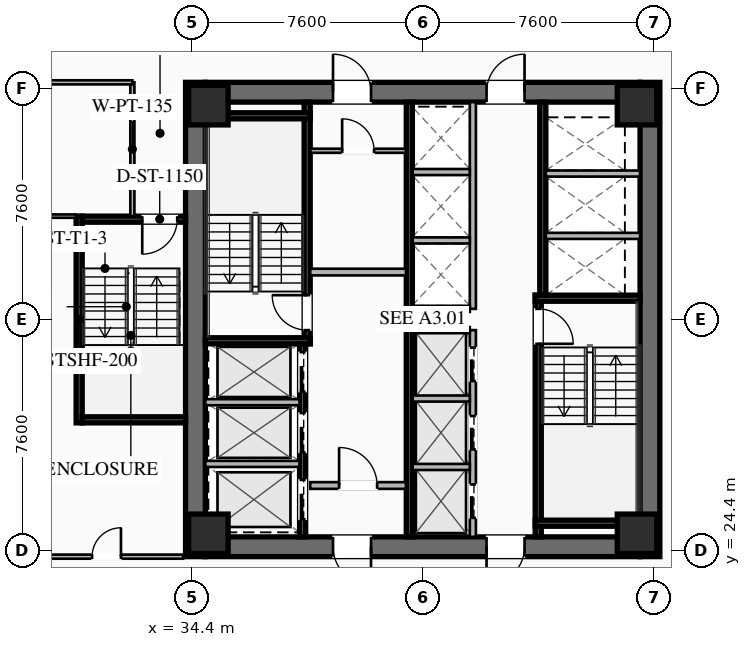
"""IFC4 building model, lengths in metres.
Left out: names, types, materials, properties, quantities, classifications, styles, units other than length and angle.
Written with IfcOpenShell. Run it as: python <this file> out.ifc"""

import sys

from ifc_helpers import new_model, si_unit, direction, frame, frame_2d, origin, origin_2d, place, context, subcontext, project, spatial, rectangle, hollow_rectangle, extrude, element, fill, save


model = new_model("IFC4")
c1 = context("Model", 3, precision=1e-05, world=origin(), true_north=direction((0.0, 1.0)))
c2 = subcontext(c1, "Body", "Model", "MODEL_VIEW")
j1 = project(units=[si_unit("LENGTHUNIT", "METRE"), si_unit("PLANEANGLEUNIT", "RADIAN")], contexts=[c1])
p1 = place(None, origin())
s1 = spatial("IfcSite", under=j1, at=p1, CompositionType="ELEMENT")
p2 = place(p1, origin())
s2 = spatial("IfcBuilding", under=s1, at=p2, CompositionType="ELEMENT")
p3 = place(p2, frame((0.0, 0.0, 63.65)))
s3 = spatial("IfcBuildingStorey", under=s2, at=p3, CompositionType="ELEMENT", Elevation=63.65)
for number, where, z_axis, x_axis in (
    (1, (34.525, 24.2, 0.0), (0.0, 0.0, 1.0), (0.0, 1.0, 0.0)),
    (2, (49.475, 39.8, 0.0), (0.0, 0.0, 1.0), (0.0, -1.0, 0.0)),
):
    element("IfcWall", number, at=place(p3, frame(where, z_axis=z_axis, x_axis=x_axis)), inside=s3, PredefinedType="SHEAR", context=c2, shape_type="SweptSolid", body=[
        extrude(rectangle(XDim=15.6, YDim=0.65, at=frame_2d((7.8, 0.0))), origin(), (0.0, 0.0, 1.0), 3.55),
    ])
p4 = place(p3, frame((49.15, 24.525, 0.0), z_axis=(0.0, 0.0, 1.0), x_axis=(-1.0, 0.0, 0.0)))
e3 = element("IfcWall", 3, at=p4, inside=s3, PredefinedType="SHEAR", context=c2, shape_type="SweptSolid", body=[
    extrude(rectangle(XDim=14.3, YDim=0.65, at=frame_2d((7.15, 0.0))), origin(), (0.0, 0.0, 1.0), 3.55),
])
p5 = place(p4, frame((8.85, 0.0, 0.0)))
e4 = element("IfcOpeningElement", 4, at=p5, cuts=e3, PredefinedType="OPENING", context=c2, shape_type="SweptSolid", body=[
    extrude(rectangle(XDim=1.25, YDim=2.25, at=frame_2d((0.625, 1.125))), frame((0.0, 0.335, 0.0), z_axis=(0.0, -1.0, 0.0), x_axis=(1.0, 0.0, 0.0)), (0.0, 0.0, 1.0), 0.67),
])
p6 = place(p4, frame((3.8, 0.0, 0.0)))
e5 = element("IfcOpeningElement", 5, at=p6, cuts=e3, PredefinedType="OPENING", context=c2, shape_type="SweptSolid", body=[
    extrude(rectangle(XDim=1.25, YDim=2.25, at=frame_2d((0.625, 1.125))), frame((0.0, 0.335, 0.0), z_axis=(0.0, -1.0, 0.0), x_axis=(1.0, 0.0, 0.0)), (0.0, 0.0, 1.0), 0.67),
])
p7 = place(p3, frame((34.85, 39.475, 0.0), z_axis=(0.0, 0.0, 1.0), x_axis=(1.0, 0.0, 0.0)))
e6 = element("IfcWall", 6, at=p7, inside=s3, PredefinedType="SHEAR", context=c2, shape_type="SweptSolid", body=[
    extrude(rectangle(XDim=14.3, YDim=0.65, at=frame_2d((7.15, 0.0))), origin(), (0.0, 0.0, 1.0), 3.55),
])
p8 = place(p7, frame((4.2, 0.0, 0.0)))
e7 = element("IfcOpeningElement", 7, at=p8, cuts=e6, PredefinedType="OPENING", context=c2, shape_type="SweptSolid", body=[
    extrude(rectangle(XDim=1.25, YDim=2.25, at=frame_2d((0.625, 1.125))), frame((0.0, 0.335, 0.0), z_axis=(0.0, -1.0, 0.0), x_axis=(1.0, 0.0, 0.0)), (0.0, 0.0, 1.0), 0.67),
])
p9 = place(p7, frame((9.25, 0.0, 0.0)))
e8 = element("IfcOpeningElement", 8, at=p9, cuts=e6, PredefinedType="OPENING", context=c2, shape_type="SweptSolid", body=[
    extrude(rectangle(XDim=1.25, YDim=2.25, at=frame_2d((0.625, 1.125))), frame((0.0, 0.335, 0.0), z_axis=(0.0, -1.0, 0.0), x_axis=(1.0, 0.0, 0.0)), (0.0, 0.0, 1.0), 0.67),
])
for number, where, z_axis, x_axis in (
    (9, (34.95, 24.95, 0.0), (0.0, 0.0, 1.0), (1.0, 0.0, 0.0)),
    (10, (49.05, 24.95, 0.0), (0.0, 0.0, 1.0), (1.0, 0.0, 0.0)),
    (11, (49.05, 39.05, 0.0), (0.0, 0.0, 1.0), (1.0, 0.0, 0.0)),
    (12, (34.95, 39.05, 0.0), (0.0, 0.0, 1.0), (1.0, 0.0, 0.0)),
):
    element("IfcColumn", number, at=place(p3, frame(where, z_axis=z_axis, x_axis=x_axis)), inside=s3, PredefinedType="COLUMN", context=c2, shape_type="SweptSolid", body=[
        extrude(hollow_rectangle(XDim=1.3, YDim=1.3, WallThickness=0.05, at=origin_2d()), origin(), (0.0, 0.0, 1.0), 3.35),
    ])
p10 = place(p3, frame((38.2, 31.2, 0.0), z_axis=(0.0, 0.0, 1.0), x_axis=(0.0, 1.0, 0.0)))
e13 = element("IfcWall", 13, at=p10, inside=s3, PredefinedType="SHEAR", context=c2, shape_type="SweptSolid", body=[
    extrude(rectangle(XDim=7.95, YDim=0.2, at=frame_2d((3.975, 0.0))), origin(), (0.0, 0.0, 1.0), 3.35),
])
p11 = place(p10, frame((0.45, 0.0, 0.0)))
e14 = element("IfcOpeningElement", 14, at=p11, cuts=e13, PredefinedType="OPENING", context=c2, shape_type="SweptSolid", body=[
    extrude(rectangle(XDim=1.15, YDim=2.2, at=frame_2d((0.575, 1.1))), frame((0.0, 0.11, 0.0), z_axis=(0.0, -1.0, 0.0), x_axis=(1.0, 0.0, 0.0)), (0.0, 0.0, 1.0), 0.22),
])
for number, where, z_axis, x_axis in (
    (15, (34.85, 31.3, 0.0), (0.0, 0.0, 1.0), (1.0, 0.0, 0.0)),
    (16, (34.85, 38.7, 0.0), (0.0, 0.0, 1.0), (1.0, 0.0, 0.0)),
):
    element("IfcWall", number, at=place(p3, frame(where, z_axis=z_axis, x_axis=x_axis)), inside=s3, PredefinedType="SHEAR", context=c2, shape_type="SweptSolid", body=[
        extrude(rectangle(XDim=3.45, YDim=0.2, at=frame_2d((1.725, 0.0))), origin(), (0.0, 0.0, 1.0), 3.35),
    ])
p12 = place(p3, frame((45.8, 32.8, 0.0), z_axis=(0.0, 0.0, 1.0), x_axis=(0.0, -1.0, 0.0)))
e17 = element("IfcWall", 17, at=p12, inside=s3, PredefinedType="SHEAR", context=c2, shape_type="SweptSolid", body=[
    extrude(rectangle(XDim=7.95, YDim=0.2, at=frame_2d((3.975, 0.0))), origin(), (0.0, 0.0, 1.0), 3.35),
])
p13 = place(p12, frame((0.45, 0.0, 0.0)))
e18 = element("IfcOpeningElement", 18, at=p13, cuts=e17, PredefinedType="OPENING", context=c2, shape_type="SweptSolid", body=[
    extrude(rectangle(XDim=1.15, YDim=2.2, at=frame_2d((0.575, 1.1))), frame((0.0, 0.11, 0.0), z_axis=(0.0, -1.0, 0.0), x_axis=(1.0, 0.0, 0.0)), (0.0, 0.0, 1.0), 0.22),
])
for number, where, z_axis, x_axis in (
    (19, (45.7, 32.7, 0.0), (0.0, 0.0, 1.0), (1.0, 0.0, 0.0)),
    (20, (45.7, 25.3, 0.0), (0.0, 0.0, 1.0), (1.0, 0.0, 0.0)),
):
    element("IfcWall", number, at=place(p3, frame(where, z_axis=z_axis, x_axis=x_axis)), inside=s3, PredefinedType="SHEAR", context=c2, shape_type="SweptSolid", body=[
        extrude(rectangle(XDim=3.45, YDim=0.2, at=frame_2d((1.725, 0.0))), origin(), (0.0, 0.0, 1.0), 3.35),
    ])
p14 = place(p3, frame((41.56, 24.85, 0.0), z_axis=(0.0, 0.0, 1.0), x_axis=(0.0, 1.0, 0.0)))
e21 = element("IfcWall", 21, at=p14, inside=s3, PredefinedType="SHEAR", context=c2, shape_type="SweptSolid", body=[
    extrude(rectangle(XDim=14.3, YDim=0.2, at=frame_2d((7.15, 0.0))), origin(), (0.0, 0.0, 1.0), 3.35),
])
p15 = place(p3, frame((38.3, 33.56, 0.0), z_axis=(0.0, 0.0, 1.0), x_axis=(1.0, 0.0, 0.0)))
e22 = element("IfcWall", 22, at=p15, inside=s3, PredefinedType="SOLIDWALL", context=c2, shape_type="SweptSolid", body=[
    extrude(rectangle(XDim=3.15, YDim=0.22, at=frame_2d((1.575, 0.0))), origin(), (0.0, 0.0, 1.0), 2.493),
])
p16 = place(p3, frame((38.3, 26.54, 0.0), z_axis=(0.0, 0.0, 1.0), x_axis=(1.0, 0.0, 0.0)))
e23 = element("IfcWall", 23, at=p16, inside=s3, PredefinedType="SOLIDWALL", context=c2, shape_type="SweptSolid", body=[
    extrude(rectangle(XDim=3.15, YDim=0.22, at=frame_2d((1.575, 0.0))), origin(), (0.0, 0.0, 1.0), 2.493),
])
p17 = place(p16, frame((0.95, 0.0, 0.0)))
e24 = element("IfcOpeningElement", 24, at=p17, cuts=e23, PredefinedType="OPENING", context=c2, shape_type="SweptSolid", body=[
    extrude(rectangle(XDim=1.25, YDim=2.25, at=frame_2d((0.625, 1.125))), frame((0.0, 0.12, 0.0), z_axis=(0.0, -1.0, 0.0), x_axis=(1.0, 0.0, 0.0)), (0.0, 0.0, 1.0), 0.24),
])
p18 = place(p3, frame((38.05, 24.85, 0.0), z_axis=(0.0, 0.0, 1.0), x_axis=(0.0, 1.0, 0.0)))
e25 = element("IfcWall", 25, at=p18, inside=s3, PredefinedType="SHEAR", context=c2, shape_type="SweptSolid", body=[
    extrude(rectangle(XDim=6.35, YDim=0.2, at=frame_2d((3.175, 0.0))), origin(), (0.0, 0.0, 1.0), 3.35),
])
p19 = place(p18, frame((4.775, 0.0, 0.0)))
e26 = element("IfcOpeningElement", 26, at=p19, cuts=e25, PredefinedType="OPENING", context=c2, shape_type="SweptSolid", body=[
    extrude(rectangle(XDim=1.3, YDim=2.25, at=frame_2d((0.65, 1.125))), frame((0.0, 0.11, 0.0), z_axis=(0.0, -1.0, 0.0), x_axis=(1.0, 0.0, 0.0)), (0.0, 0.0, 1.0), 0.22),
])
p20 = place(p18, frame((2.775, 0.0, 0.0)))
e27 = element("IfcOpeningElement", 27, at=p20, cuts=e25, PredefinedType="OPENING", context=c2, shape_type="SweptSolid", body=[
    extrude(rectangle(XDim=1.3, YDim=2.25, at=frame_2d((0.65, 1.125))), frame((0.0, 0.11, 0.0), z_axis=(0.0, -1.0, 0.0), x_axis=(1.0, 0.0, 0.0)), (0.0, 0.0, 1.0), 0.22),
])
p21 = place(p18, frame((0.575, 0.0, 0.0)))
e28 = element("IfcOpeningElement", 28, at=p21, cuts=e25, PredefinedType="OPENING", context=c2, shape_type="SweptSolid", body=[
    extrude(rectangle(XDim=1.3, YDim=2.25, at=frame_2d((0.65, 1.125))), frame((0.0, 0.11, 0.0), z_axis=(0.0, -1.0, 0.0), x_axis=(1.0, 0.0, 0.0)), (0.0, 0.0, 1.0), 0.22),
])
for number, where, z_axis, x_axis in (
    (29, (34.85, 27.25, 0.0), (0.0, 0.0, 1.0), (1.0, 0.0, 0.0)),
    (30, (34.85, 29.28, 0.0), (0.0, 0.0, 1.0), (1.0, 0.0, 0.0)),
):
    element("IfcWall", number, at=place(p3, frame(where, z_axis=z_axis, x_axis=x_axis)), inside=s3, PredefinedType="SOLIDWALL", context=c2, shape_type="SweptSolid", body=[
        extrude(rectangle(XDim=3.1, YDim=0.2, at=frame_2d((1.55, 0.0))), origin(), (0.0, 0.0, 1.0), 3.35),
    ])
p22 = place(p3, frame((45.95, 39.15, 0.0), z_axis=(0.0, 0.0, 1.0), x_axis=(0.0, -1.0, 0.0)))
e31 = element("IfcWall", 31, at=p22, inside=s3, PredefinedType="SHEAR", context=c2, shape_type="SweptSolid", body=[
    extrude(rectangle(XDim=6.35, YDim=0.2, at=frame_2d((3.175, 0.0))), origin(), (0.0, 0.0, 1.0), 3.35),
])
for number, where, z_axis, x_axis in (
    (32, (46.05, 34.75, 0.0), (0.0, 0.0, 1.0), (1.0, 0.0, 0.0)),
    (33, (46.05, 36.8, 0.0), (0.0, 0.0, 1.0), (1.0, 0.0, 0.0)),
):
    element("IfcWall", number, at=place(p3, frame(where, z_axis=z_axis, x_axis=x_axis)), inside=s3, PredefinedType="SOLIDWALL", context=c2, shape_type="SweptSolid", body=[
        extrude(rectangle(XDim=3.1, YDim=0.2, at=frame_2d((1.55, 0.0))), origin(), (0.0, 0.0, 1.0), 3.35),
    ])
p23 = place(p3, frame((38.3, 37.55, 0.0), z_axis=(0.0, 0.0, 1.0), x_axis=(1.0, 0.0, 0.0)))
e34 = element("IfcWall", 34, at=p23, inside=s3, PredefinedType="PARTITIONING", context=c2, shape_type="SweptSolid", body=[
    extrude(rectangle(XDim=3.15, YDim=0.135, at=frame_2d((1.575, 0.0))), origin(), (0.0, 0.0, 1.0), 2.493),
])
p24 = place(p23, frame((1.05, 0.0, 0.0)))
e35 = element("IfcOpeningElement", 35, at=p24, cuts=e34, PredefinedType="OPENING", context=c2, shape_type="SweptSolid", body=[
    extrude(rectangle(XDim=1.05, YDim=2.2, at=frame_2d((0.525, 1.1))), frame((0.0, 0.077, 0.0), z_axis=(0.0, -1.0, 0.0), x_axis=(1.0, 0.0, 0.0)), (0.0, 0.0, 1.0), 0.155),
])
p25 = place(p3, frame((43.65, 24.85, 0.0), z_axis=(0.0, 0.0, 1.0), x_axis=(0.0, 1.0, 0.0)))
e36 = element("IfcWall", 36, at=p25, inside=s3, PredefinedType="SOLIDWALL", context=c2, shape_type="SweptSolid", body=[
    extrude(rectangle(XDim=6.8, YDim=0.2, at=frame_2d((3.4, 0.0))), origin(), (0.0, 0.0, 1.0), 3.35),
])
p26 = place(p25, frame((0.625, 0.0, 0.0)))
e37 = element("IfcOpeningElement", 37, at=p26, cuts=e36, PredefinedType="OPENING", context=c2, shape_type="SweptSolid", body=[
    extrude(rectangle(XDim=1.1, YDim=2.2, at=frame_2d((0.55, 1.1))), frame((0.0, 0.11, 0.0), z_axis=(0.0, -1.0, 0.0), x_axis=(1.0, 0.0, 0.0)), (0.0, 0.0, 1.0), 0.22),
])
p27 = place(p25, frame((2.875, 0.0, 0.0)))
e38 = element("IfcOpeningElement", 38, at=p27, cuts=e36, PredefinedType="OPENING", context=c2, shape_type="SweptSolid", body=[
    extrude(rectangle(XDim=1.1, YDim=2.2, at=frame_2d((0.55, 1.1))), frame((0.0, 0.11, 0.0), z_axis=(0.0, -1.0, 0.0), x_axis=(1.0, 0.0, 0.0)), (0.0, 0.0, 1.0), 0.22),
])
p28 = place(p25, frame((5.125, 0.0, 0.0)))
e39 = element("IfcOpeningElement", 39, at=p28, cuts=e36, PredefinedType="OPENING", context=c2, shape_type="SweptSolid", body=[
    extrude(rectangle(XDim=1.1, YDim=2.2, at=frame_2d((0.55, 1.1))), frame((0.0, 0.11, 0.0), z_axis=(0.0, -1.0, 0.0), x_axis=(1.0, 0.0, 0.0)), (0.0, 0.0, 1.0), 0.22),
])
for number, where, z_axis, x_axis in (
    (40, (41.67, 27.15, 0.0), (0.0, 0.0, 1.0), (1.0, 0.0, 0.0)),
    (41, (41.67, 29.4, 0.0), (0.0, 0.0, 1.0), (1.0, 0.0, 0.0)),
    (42, (41.67, 31.65, 0.0), (0.0, 0.0, 1.0), (1.0, 0.0, 0.0)),
):
    element("IfcWall", number, at=place(p3, frame(where, z_axis=z_axis, x_axis=x_axis)), inside=s3, PredefinedType="SOLIDWALL", context=c2, shape_type="SweptSolid", body=[
        extrude(rectangle(XDim=1.88, YDim=0.2, at=frame_2d((0.94, 0.0))), origin(), (0.0, 0.0, 1.0), 3.35),
    ])
p29 = place(p3, frame((43.65, 32.35, 0.0), z_axis=(0.0, 0.0, 1.0), x_axis=(0.0, 1.0, 0.0)))
e43 = element("IfcWall", 43, at=p29, inside=s3, PredefinedType="SOLIDWALL", context=c2, shape_type="SweptSolid", body=[
    extrude(rectangle(XDim=6.8, YDim=0.2, at=frame_2d((3.4, 0.0))), origin(), (0.0, 0.0, 1.0), 3.35),
])
for number, where, z_axis, x_axis in (
    (44, (41.67, 32.35, 0.0), (0.0, 0.0, 1.0), (1.0, 0.0, 0.0)),
    (45, (41.67, 34.6, 0.0), (0.0, 0.0, 1.0), (1.0, 0.0, 0.0)),
    (46, (41.67, 36.85, 0.0), (0.0, 0.0, 1.0), (1.0, 0.0, 0.0)),
):
    element("IfcWall", number, at=place(p3, frame(where, z_axis=z_axis, x_axis=x_axis)), inside=s3, PredefinedType="SOLIDWALL", context=c2, shape_type="SweptSolid", body=[
        extrude(rectangle(XDim=1.88, YDim=0.2, at=frame_2d((0.94, 0.0))), origin(), (0.0, 0.0, 1.0), 3.35),
    ])
p30 = place(p3, frame((30.7, 28.6, 0.0), z_axis=(0.0, 0.0, 1.0), x_axis=(0.0, 1.0, 0.0)))
e47 = element("IfcWall", 47, at=p30, inside=s3, PredefinedType="SHEAR", context=c2, shape_type="SweptSolid", body=[
    extrude(rectangle(XDim=6.8, YDim=0.2, at=frame_2d((3.4, 0.0))), origin(), (0.0, 0.0, 1.0), 3.35),
])
p31 = place(p3, frame((34.2, 35.3, 0.0), z_axis=(0.0, 0.0, 1.0), x_axis=(-1.0, 0.0, 0.0)))
e48 = element("IfcWall", 48, at=p31, inside=s3, PredefinedType="SHEAR", context=c2, shape_type="SweptSolid", body=[
    extrude(rectangle(XDim=3.4, YDim=0.2, at=frame_2d((1.7, 0.0))), origin(), (0.0, 0.0, 1.0), 3.35),
])
p32 = place(p31, frame((0.275, 0.0, 0.0)))
e49 = element("IfcOpeningElement", 49, at=p32, cuts=e48, PredefinedType="OPENING", context=c2, shape_type="SweptSolid", body=[
    extrude(rectangle(XDim=1.15, YDim=2.2, at=frame_2d((0.575, 1.1))), frame((0.0, 0.11, 0.0), z_axis=(0.0, -1.0, 0.0), x_axis=(1.0, 0.0, 0.0)), (0.0, 0.0, 1.0), 0.22),
])
p33 = place(p3, frame((30.8, 28.7, 0.0), z_axis=(0.0, 0.0, 1.0), x_axis=(1.0, 0.0, 0.0)))
e50 = element("IfcWall", 50, at=p33, inside=s3, PredefinedType="SHEAR", context=c2, shape_type="SweptSolid", body=[
    extrude(rectangle(XDim=3.4, YDim=0.2, at=frame_2d((1.7, 0.0))), origin(), (0.0, 0.0, 1.0), 3.35),
])
p34 = place(p3, frame((32.45, 35.4, 0.0), z_axis=(0.0, 0.0, 1.0), x_axis=(0.0, 1.0, 0.0)))
e51 = element("IfcWall", 51, at=p34, inside=s3, PredefinedType="PARTITIONING", context=c2, shape_type="SweptSolid", body=[
    extrude(rectangle(XDim=4.4, YDim=0.135, at=frame_2d((2.2, 0.0))), origin(), (0.0, 0.0, 1.0), 2.493),
])
p35 = place(p3, frame((32.45, 39.8, 0.0), z_axis=(0.0, 0.0, 1.0), x_axis=(-1.0, 0.0, 0.0)))
e52 = element("IfcWall", 52, at=p35, inside=s3, PredefinedType="PARTITIONING", context=c2, shape_type="SweptSolid", body=[
    extrude(rectangle(XDim=13.33, YDim=0.135, at=frame_2d((6.665, 0.0))), origin(), (0.0, 0.0, 1.0), 2.493),
])
p36 = place(p35, frame((5.84, 0.0, 0.0)))
e53 = element("IfcOpeningElement", 53, at=p36, cuts=e52, PredefinedType="OPENING", context=c2, shape_type="SweptSolid", body=[
    extrude(rectangle(XDim=0.95, YDim=2.05, at=frame_2d((0.475, 1.025))), frame((0.0, 0.077, 0.0), z_axis=(0.0, -1.0, 0.0), x_axis=(1.0, 0.0, 0.0)), (0.0, 0.0, 1.0), 0.155),
])
p37 = place(p3, frame((19.12, 24.2, 0.0), z_axis=(0.0, 0.0, 1.0), x_axis=(1.0, 0.0, 0.0)))
e54 = element("IfcWall", 54, at=p37, inside=s3, PredefinedType="PARTITIONING", context=c2, shape_type="SweptSolid", body=[
    extrude(rectangle(XDim=15.0, YDim=0.135, at=frame_2d((7.5, 0.0))), origin(), (0.0, 0.0, 1.0), 2.493),
])
p38 = place(p37, frame((12.005, 0.0, 0.0)))
e55 = element("IfcOpeningElement", 55, at=p38, cuts=e54, PredefinedType="OPENING", context=c2, shape_type="SweptSolid", body=[
    extrude(rectangle(XDim=0.95, YDim=2.05, at=frame_2d((0.475, 1.025))), frame((0.0, 0.077, 0.0), z_axis=(0.0, -1.0, 0.0), x_axis=(1.0, 0.0, 0.0)), (0.0, 0.0, 1.0), 0.155),
])
p39 = place(p3, frame((30.6, 35.4, 0.0), z_axis=(0.0, 0.0, 1.0), x_axis=(-1.0, 0.0, 0.0)))
e56 = element("IfcWall", 56, at=p39, inside=s3, PredefinedType="PARTITIONING", context=c2, shape_type="SweptSolid", body=[
    extrude(rectangle(XDim=11.48, YDim=0.11, at=frame_2d((5.74, 0.0))), origin(), (0.0, 0.0, 1.0), 2.493),
])
p40 = place(p8, origin())
e57 = element("IfcDoor", 57, at=p40, inside=s3, OperationType="SINGLE_SWING_LEFT", PredefinedType="DOOR", context=c2, shape_type="SweptSolid", body=[
    extrude(rectangle(XDim=1.25, YDim=2.25, at=frame_2d((0.625, 1.125))), frame((0.0, 0.025, 0.0), z_axis=(0.0, -1.0, 0.0), x_axis=(1.0, 0.0, 0.0)), (0.0, 0.0, 1.0), 0.05),
])
fill(e7, e57)
p41 = place(p9, origin())
e58 = element("IfcDoor", 58, at=p41, inside=s3, OperationType="SINGLE_SWING_RIGHT", PredefinedType="DOOR", context=c2, shape_type="SweptSolid", body=[
    extrude(rectangle(XDim=1.25, YDim=2.25, at=frame_2d((0.625, 1.125))), frame((0.0, 0.025, 0.0), z_axis=(0.0, -1.0, 0.0), x_axis=(1.0, 0.0, 0.0)), (0.0, 0.0, 1.0), 0.05),
])
fill(e8, e58)
p42 = place(p5, origin())
e59 = element("IfcDoor", 59, at=p42, inside=s3, OperationType="SINGLE_SWING_LEFT", PredefinedType="DOOR", context=c2, shape_type="SweptSolid", body=[
    extrude(rectangle(XDim=1.25, YDim=2.25, at=frame_2d((0.625, 1.125))), frame((0.0, 0.025, 0.0), z_axis=(0.0, -1.0, 0.0), x_axis=(1.0, 0.0, 0.0)), (0.0, 0.0, 1.0), 0.05),
])
fill(e4, e59)
p43 = place(p6, origin())
e60 = element("IfcDoor", 60, at=p43, inside=s3, OperationType="SINGLE_SWING_RIGHT", PredefinedType="DOOR", context=c2, shape_type="SweptSolid", body=[
    extrude(rectangle(XDim=1.25, YDim=2.25, at=frame_2d((0.625, 1.125))), frame((0.0, 0.025, 0.0), z_axis=(0.0, -1.0, 0.0), x_axis=(1.0, 0.0, 0.0)), (0.0, 0.0, 1.0), 0.05),
])
fill(e5, e60)
p44 = place(p11, origin())
e61 = element("IfcDoor", 61, at=p44, inside=s3, OperationType="SINGLE_SWING_RIGHT", PredefinedType="DOOR", context=c2, shape_type="SweptSolid", body=[
    extrude(rectangle(XDim=1.15, YDim=2.2, at=frame_2d((0.575, 1.1))), frame((0.0, 0.025, 0.0), z_axis=(0.0, -1.0, 0.0), x_axis=(1.0, 0.0, 0.0)), (0.0, 0.0, 1.0), 0.05),
])
fill(e14, e61)
p45 = place(p13, origin())
e62 = element("IfcDoor", 62, at=p45, inside=s3, OperationType="SINGLE_SWING_RIGHT", PredefinedType="DOOR", context=c2, shape_type="SweptSolid", body=[
    extrude(rectangle(XDim=1.15, YDim=2.2, at=frame_2d((0.575, 1.1))), frame((0.0, 0.025, 0.0), z_axis=(0.0, -1.0, 0.0), x_axis=(1.0, 0.0, 0.0)), (0.0, 0.0, 1.0), 0.05),
])
fill(e18, e62)
p46 = place(p17, origin())
e63 = element("IfcDoor", 63, at=p46, inside=s3, OperationType="SINGLE_SWING_LEFT", PredefinedType="DOOR", context=c2, shape_type="SweptSolid", body=[
    extrude(rectangle(XDim=1.25, YDim=2.25, at=frame_2d((0.625, 1.125))), frame((0.0, 0.025, 0.0), z_axis=(0.0, -1.0, 0.0), x_axis=(1.0, 0.0, 0.0)), (0.0, 0.0, 1.0), 0.05),
])
fill(e24, e63)
p47 = place(p24, origin())
e64 = element("IfcDoor", 64, at=p47, inside=s3, OperationType="SINGLE_SWING_LEFT", PredefinedType="DOOR", context=c2, shape_type="SweptSolid", body=[
    extrude(rectangle(XDim=1.05, YDim=2.2, at=frame_2d((0.525, 1.1))), frame((0.0, 0.025, 0.0), z_axis=(0.0, -1.0, 0.0), x_axis=(1.0, 0.0, 0.0)), (0.0, 0.0, 1.0), 0.05),
])
fill(e35, e64)
p48 = place(p32, origin())
e65 = element("IfcDoor", 65, at=p48, inside=s3, OperationType="SINGLE_SWING_RIGHT", PredefinedType="DOOR", context=c2, shape_type="SweptSolid", body=[
    extrude(rectangle(XDim=1.15, YDim=2.2, at=frame_2d((0.575, 1.1))), frame((0.0, 0.025, 0.0), z_axis=(0.0, -1.0, 0.0), x_axis=(1.0, 0.0, 0.0)), (0.0, 0.0, 1.0), 0.05),
])
fill(e49, e65)
p49 = place(p38, origin())
e66 = element("IfcDoor", 66, at=p49, inside=s3, OperationType="SINGLE_SWING_RIGHT", PredefinedType="DOOR", context=c2, shape_type="SweptSolid", body=[
    extrude(rectangle(XDim=0.95, YDim=2.05, at=frame_2d((0.475, 1.025))), frame((0.0, 0.025, 0.0), z_axis=(0.0, -1.0, 0.0), x_axis=(1.0, 0.0, 0.0)), (0.0, 0.0, 1.0), 0.05),
])
fill(e55, e66)
p50 = place(p19, origin())
e67 = element("IfcDoor", 67, at=p50, inside=s3, OperationType="SLIDING_TO_LEFT", PredefinedType="DOOR", context=c2, shape_type="SweptSolid", body=[
    extrude(rectangle(XDim=1.3, YDim=2.25, at=frame_2d((0.65, 1.125))), frame((0.0, 0.025, 0.0), z_axis=(0.0, -1.0, 0.0), x_axis=(1.0, 0.0, 0.0)), (0.0, 0.0, 1.0), 0.05),
])
fill(e26, e67)
p51 = place(p20, origin())
e68 = element("IfcDoor", 68, at=p51, inside=s3, OperationType="SLIDING_TO_LEFT", PredefinedType="DOOR", context=c2, shape_type="SweptSolid", body=[
    extrude(rectangle(XDim=1.3, YDim=2.25, at=frame_2d((0.65, 1.125))), frame((0.0, 0.025, 0.0), z_axis=(0.0, -1.0, 0.0), x_axis=(1.0, 0.0, 0.0)), (0.0, 0.0, 1.0), 0.05),
])
fill(e27, e68)
p52 = place(p21, origin())
e69 = element("IfcDoor", 69, at=p52, inside=s3, OperationType="SLIDING_TO_LEFT", PredefinedType="DOOR", context=c2, shape_type="SweptSolid", body=[
    extrude(rectangle(XDim=1.3, YDim=2.25, at=frame_2d((0.65, 1.125))), frame((0.0, 0.025, 0.0), z_axis=(0.0, -1.0, 0.0), x_axis=(1.0, 0.0, 0.0)), (0.0, 0.0, 1.0), 0.05),
])
fill(e28, e69)
p53 = place(p26, origin())
e70 = element("IfcDoor", 70, at=p53, inside=s3, OperationType="SLIDING_TO_LEFT", PredefinedType="DOOR", context=c2, shape_type="SweptSolid", body=[
    extrude(rectangle(XDim=1.1, YDim=2.2, at=frame_2d((0.55, 1.1))), frame((0.0, 0.025, 0.0), z_axis=(0.0, -1.0, 0.0), x_axis=(1.0, 0.0, 0.0)), (0.0, 0.0, 1.0), 0.05),
])
fill(e37, e70)
p54 = place(p27, origin())
e71 = element("IfcDoor", 71, at=p54, inside=s3, OperationType="SLIDING_TO_LEFT", PredefinedType="DOOR", context=c2, shape_type="SweptSolid", body=[
    extrude(rectangle(XDim=1.1, YDim=2.2, at=frame_2d((0.55, 1.1))), frame((0.0, 0.025, 0.0), z_axis=(0.0, -1.0, 0.0), x_axis=(1.0, 0.0, 0.0)), (0.0, 0.0, 1.0), 0.05),
])
fill(e38, e71)
p55 = place(p28, origin())
e72 = element("IfcDoor", 72, at=p55, inside=s3, OperationType="SLIDING_TO_LEFT", PredefinedType="DOOR", context=c2, shape_type="SweptSolid", body=[
    extrude(rectangle(XDim=1.1, YDim=2.2, at=frame_2d((0.55, 1.1))), frame((0.0, 0.025, 0.0), z_axis=(0.0, -1.0, 0.0), x_axis=(1.0, 0.0, 0.0)), (0.0, 0.0, 1.0), 0.05),
])
fill(e39, e72)
save(model, sys.argv[1])
